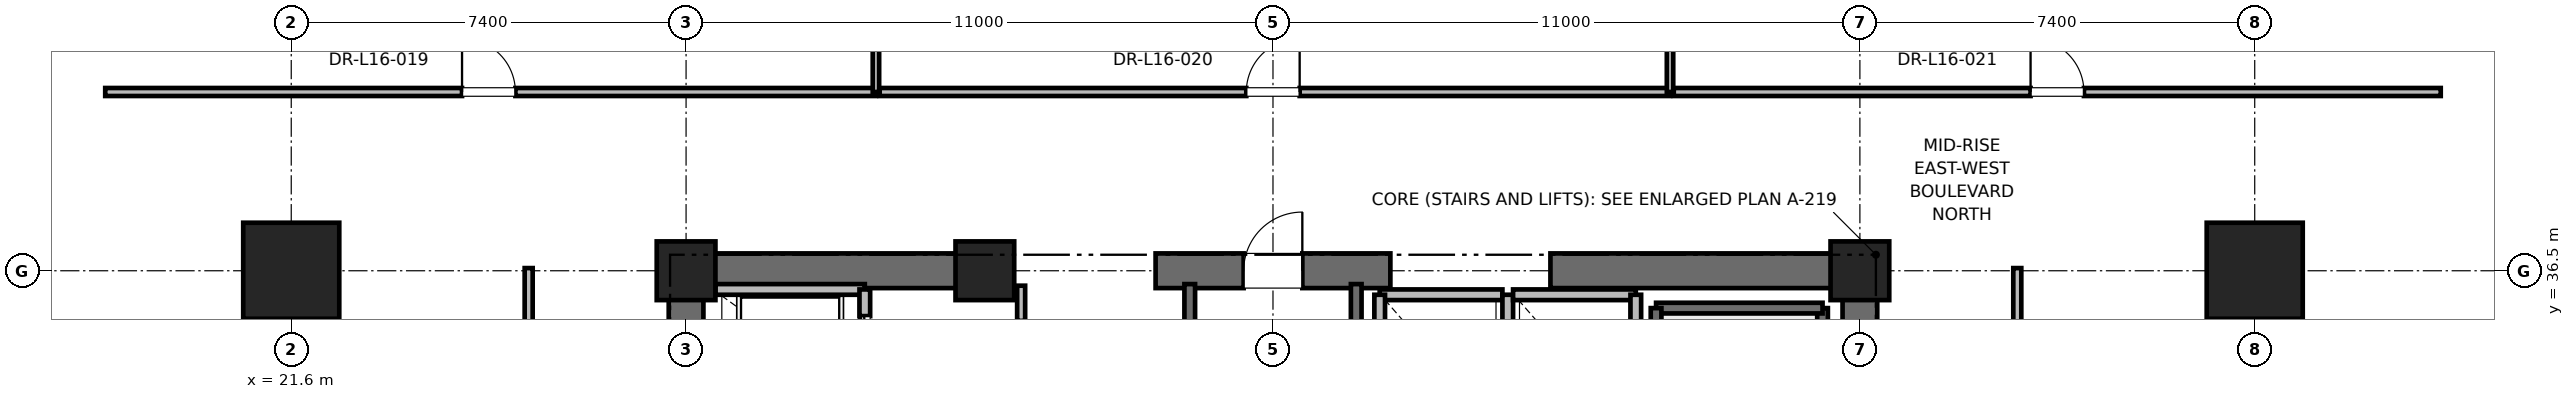
"""IFC4 building model, lengths in metres.
Left out: names, types, materials, properties, quantities, classifications, styles, units other than length and angle.
Written with IfcOpenShell. Run it as: python <this file> out.ifc"""

import sys

from ifc_helpers import new_model, si_unit, direction, frame, frame_2d, origin, origin_2d, place, context, subcontext, project, spatial, rectangle, extrude, element, fill, save


model = new_model("IFC4")
c1 = context("Model", 3, precision=1e-05, world=origin(), true_north=direction((0.0, 1.0)))
c2 = subcontext(c1, "Body", "Model", "MODEL_VIEW")
j1 = project(units=[si_unit("LENGTHUNIT", "METRE"), si_unit("PLANEANGLEUNIT", "RADIAN")], contexts=[c1])
p1 = place(None, origin())
s1 = spatial("IfcSite", under=j1, at=p1, CompositionType="ELEMENT")
p2 = place(p1, origin())
s2 = spatial("IfcBuilding", under=s1, at=p2, CompositionType="ELEMENT")
p3 = place(p2, frame((0.0, 0.0, 71.6)))
s3 = spatial("IfcBuildingStorey", under=s2, at=p3, CompositionType="ELEMENT", Elevation=71.6)
for number, where, z_axis, x_axis in (
    (1, (21.6, 36.5, 0.0), (0.0, 0.0, 1.0), (1.0, 0.0, 0.0)),
    (2, (58.4, 36.5, 0.0), (0.0, 0.0, 1.0), (1.0, 0.0, 0.0)),
):
    element("IfcColumn", number, at=place(p3, frame(where, z_axis=z_axis, x_axis=x_axis)), inside=s3, PredefinedType="COLUMN", context=c2, shape_type="SweptSolid", body=[
        extrude(rectangle(XDim=1.8, YDim=1.8, at=origin_2d()), origin(), (0.0, 0.0, 1.0), 4.0),
    ])
for number, where, z_axis, x_axis in (
    (3, (29.0, 36.5, 0.0), (0.0, 0.0, 1.0), (1.0, 0.0, 0.0)),
    (4, (51.0, 36.5, 0.0), (0.0, 0.0, 1.0), (1.0, 0.0, 0.0)),
    (5, (34.6, 36.5, 0.0), (0.0, 0.0, 1.0), (1.0, 0.0, 0.0)),
):
    element("IfcColumn", number, at=place(p3, frame(where, z_axis=z_axis, x_axis=x_axis)), inside=s3, PredefinedType="PILASTER", context=c2, shape_type="SweptSolid", body=[
        extrude(rectangle(XDim=1.1, YDim=1.1, at=origin_2d()), origin(), (0.0, 0.0, 1.0), 4.0),
    ])
p4 = place(p3, frame((29.0, 36.5, 0.0), z_axis=(0.0, 0.0, 1.0), x_axis=(1.0, 0.0, 0.0)))
e6 = element("IfcWall", 6, at=p4, inside=s3, PredefinedType="SHEAR", context=c2, shape_type="SweptSolid", body=[
    extrude(rectangle(XDim=5.8, YDim=0.65, at=frame_2d((2.9, 0.0))), origin(), (0.0, 0.0, 1.0), 3.76),
])
p5 = place(p3, frame((37.8, 36.5, 0.0), z_axis=(0.0, 0.0, 1.0), x_axis=(1.0, 0.0, 0.0)))
e7 = element("IfcWall", 7, at=p5, inside=s3, PredefinedType="SHEAR", context=c2, shape_type="SweptSolid", body=[
    extrude(rectangle(XDim=4.4, YDim=0.65, at=frame_2d((2.2, 0.0))), origin(), (0.0, 0.0, 1.0), 3.76),
])
p6 = place(p5, frame((1.65, 0.0, 0.0)))
e8 = element("IfcOpeningElement", 8, at=p6, cuts=e7, PredefinedType="OPENING", context=c2, shape_type="SweptSolid", body=[
    extrude(rectangle(XDim=1.1, YDim=2.15, at=frame_2d((0.55, 1.075))), frame((0.0, 0.325, 0.0), z_axis=(0.0, -1.0, 0.0), x_axis=(1.0, 0.0, 0.0)), (0.0, 0.0, 1.0), 0.65),
])
for number, where, z_axis, x_axis in (
    (9, (45.2, 36.5, 0.0), (0.0, 0.0, 1.0), (1.0, 0.0, 0.0)),
    (10, (29.0, 30.7, 0.0), (0.0, 0.0, 1.0), (0.0, 1.0, 0.0)),
):
    element("IfcWall", number, at=place(p3, frame(where, z_axis=z_axis, x_axis=x_axis)), inside=s3, PredefinedType="SHEAR", context=c2, shape_type="SweptSolid", body=[
        extrude(rectangle(XDim=5.8, YDim=0.65, at=frame_2d((2.9, 0.0))), origin(), (0.0, 0.0, 1.0), 3.76),
    ])
p7 = place(p3, frame((51.0, 27.7, 0.0), z_axis=(0.0, 0.0, 1.0), x_axis=(0.0, 1.0, 0.0)))
e11 = element("IfcWall", 11, at=p7, inside=s3, PredefinedType="SHEAR", context=c2, shape_type="SweptSolid", body=[
    extrude(rectangle(XDim=8.8, YDim=0.65, at=frame_2d((4.4, 0.0))), origin(), (0.0, 0.0, 1.0), 3.76),
])
p8 = place(p3, frame((50.3, 27.65, 0.0), z_axis=(0.0, 0.0, 1.0), x_axis=(0.0, 1.0, 0.0)))
e12 = element("IfcWall", 12, at=p8, inside=s3, PredefinedType="SOLIDWALL", context=c2, shape_type="SweptSolid", body=[
    extrude(rectangle(XDim=8.15, YDim=0.2, at=frame_2d((4.075, 0.0))), origin(), (0.0, 0.0, 1.0), 3.76),
])
p9 = place(p3, frame((47.18, 35.8, 0.0), z_axis=(0.0, 0.0, 1.0), x_axis=(1.0, 0.0, 0.0)))
e13 = element("IfcWall", 13, at=p9, inside=s3, PredefinedType="SOLIDWALL", context=c2, shape_type="SweptSolid", body=[
    extrude(rectangle(XDim=3.12, YDim=0.2, at=frame_2d((1.56, 0.0))), origin(), (0.0, 0.0, 1.0), 3.76),
])
p10 = place(p3, frame((47.18, 27.62, 0.0), z_axis=(0.0, 0.0, 1.0), x_axis=(0.0, 1.0, 0.0)))
e14 = element("IfcWall", 14, at=p10, inside=s3, PredefinedType="SOLIDWALL", context=c2, shape_type="SweptSolid", body=[
    extrude(rectangle(XDim=8.18, YDim=0.2, at=frame_2d((4.09, 0.0))), origin(), (0.0, 0.0, 1.0), 3.76),
])
p11 = place(p3, frame((38.44, 27.38, 0.0), z_axis=(0.0, 0.0, 1.0), x_axis=(0.0, 1.0, 0.0)))
e15 = element("IfcWall", 15, at=p11, inside=s3, PredefinedType="SOLIDWALL", context=c2, shape_type="SweptSolid", body=[
    extrude(rectangle(XDim=8.87, YDim=0.2, at=frame_2d((4.435, 0.0))), origin(), (0.0, 0.0, 1.0), 3.76),
])
p12 = place(p3, frame((41.56, 27.68, 0.0), z_axis=(0.0, 0.0, 1.0), x_axis=(0.0, 1.0, 0.0)))
e16 = element("IfcWall", 16, at=p12, inside=s3, PredefinedType="SOLIDWALL", context=c2, shape_type="SweptSolid", body=[
    extrude(rectangle(XDim=8.57, YDim=0.2, at=frame_2d((4.285, 0.0))), origin(), (0.0, 0.0, 1.0), 3.76),
])
p13 = place(p3, frame((32.35, 36.15, 0.0), z_axis=(0.0, 0.0, 1.0), x_axis=(-1.0, 0.0, 0.0)))
e17 = element("IfcWall", 17, at=p13, inside=s3, PredefinedType="SOLIDWALL", context=c2, shape_type="SweptSolid", body=[
    extrude(rectangle(XDim=2.8, YDim=0.2, at=frame_2d((1.4, 0.0))), origin(), (0.0, 0.0, 1.0), 2.889),
])
p14 = place(p3, frame((32.35, 34.05, 0.0), z_axis=(0.0, 0.0, 1.0), x_axis=(0.0, 1.0, 0.0)))
e18 = element("IfcWall", 18, at=p14, inside=s3, PredefinedType="SOLIDWALL", context=c2, shape_type="SweptSolid", body=[
    extrude(rectangle(XDim=2.1, YDim=0.2, at=frame_2d((1.05, 0.0))), origin(), (0.0, 0.0, 1.0), 3.76),
])
p15 = place(p14, frame((0.5, 0.0, 0.0)))
e19 = element("IfcOpeningElement", 19, at=p15, cuts=e18, PredefinedType="OPENING", context=c2, shape_type="SweptSolid", body=[
    extrude(rectangle(XDim=1.1, YDim=2.2, at=frame_2d((0.55, 1.1))), frame((0.0, 0.1, 0.0), z_axis=(0.0, -1.0, 0.0), x_axis=(1.0, 0.0, 0.0)), (0.0, 0.0, 1.0), 0.2),
])
p16 = place(p3, frame((44.3, 36.05, 0.0), z_axis=(0.0, 0.0, 1.0), x_axis=(-1.0, 0.0, 0.0)))
e20 = element("IfcWall", 20, at=p16, inside=s3, PredefinedType="SOLIDWALL", context=c2, shape_type="SweptSolid", body=[
    extrude(rectangle(XDim=2.3, YDim=0.2, at=frame_2d((1.15, 0.0))), origin(), (0.0, 0.0, 1.0), 2.54),
])
for number, where, z_axis, x_axis in (
    (21, (42.0, 36.05, 0.0), (0.0, 0.0, 1.0), (0.0, -1.0, 0.0)),
    (22, (44.4, 33.45, 0.0), (0.0, 0.0, 1.0), (0.0, 1.0, 0.0)),
):
    element("IfcWall", number, at=place(p3, frame(where, z_axis=z_axis, x_axis=x_axis)), inside=s3, PredefinedType="SOLIDWALL", context=c2, shape_type="SweptSolid", body=[
        extrude(rectangle(XDim=2.6, YDim=0.2, at=frame_2d((1.3, 0.0))), origin(), (0.0, 0.0, 1.0), 2.54),
    ])
p17 = place(p3, frame((46.8, 36.05, 0.0), z_axis=(0.0, 0.0, 1.0), x_axis=(-1.0, 0.0, 0.0)))
e23 = element("IfcWall", 23, at=p17, inside=s3, PredefinedType="SOLIDWALL", context=c2, shape_type="SweptSolid", body=[
    extrude(rectangle(XDim=2.3, YDim=0.2, at=frame_2d((1.15, 0.0))), origin(), (0.0, 0.0, 1.0), 2.54),
])
p18 = place(p3, frame((46.8, 33.45, 0.0), z_axis=(0.0, 0.0, 1.0), x_axis=(0.0, 1.0, 0.0)))
e24 = element("IfcWall", 24, at=p18, inside=s3, PredefinedType="SOLIDWALL", context=c2, shape_type="SweptSolid", body=[
    extrude(rectangle(XDim=2.6, YDim=0.2, at=frame_2d((1.3, 0.0))), origin(), (0.0, 0.0, 1.0), 3.76),
])
p19 = place(p3, frame((35.28, 33.95, 0.0), z_axis=(0.0, 0.0, 1.0), x_axis=(0.0, 1.0, 0.0)))
e25 = element("IfcWall", 25, at=p19, inside=s3, PredefinedType="PARTITIONING", context=c2, shape_type="SweptSolid", body=[
    extrude(rectangle(XDim=2.27, YDim=0.15, at=frame_2d((1.135, 0.0))), origin(), (0.0, 0.0, 1.0), 2.54),
])
p20 = place(p19, frame((0.66, 0.0, 0.0)))
e26 = element("IfcOpeningElement", 26, at=p20, cuts=e25, PredefinedType="OPENING", context=c2, shape_type="SweptSolid", body=[
    extrude(rectangle(XDim=0.95, YDim=2.15, at=frame_2d((0.475, 1.075))), frame((0.0, 0.075, 0.0), z_axis=(0.0, -1.0, 0.0), x_axis=(1.0, 0.0, 0.0)), (0.0, 0.0, 1.0), 0.15),
])
p21 = place(p3, frame((18.114, 39.85, 0.0), z_axis=(0.0, 0.0, 1.0), x_axis=(1.0, 0.0, 0.0)))
e27 = element("IfcWall", 27, at=p21, inside=s3, PredefinedType="PARTITIONING", context=c2, shape_type="SweptSolid", body=[
    extrude(rectangle(XDim=14.445, YDim=0.15, at=frame_2d((7.223, 0.0))), origin(), (0.0, 0.0, 1.0), 2.85),
])
p22 = place(p21, frame((6.688, 0.0, 0.0)))
e28 = element("IfcOpeningElement", 28, at=p22, cuts=e27, PredefinedType="OPENING", context=c2, shape_type="SweptSolid", body=[
    extrude(rectangle(XDim=1.0, YDim=2.15, at=frame_2d((0.5, 1.075))), frame((0.0, 0.075, 0.0), z_axis=(0.0, -1.0, 0.0), x_axis=(1.0, 0.0, 0.0)), (0.0, 0.0, 1.0), 0.15),
])
p23 = place(p3, frame((32.559, 39.85, 0.0), z_axis=(0.0, 0.0, 1.0), x_axis=(0.0, 1.0, 0.0)))
e29 = element("IfcWall", 29, at=p23, inside=s3, PredefinedType="PARTITIONING", context=c2, shape_type="SweptSolid", body=[
    extrude(rectangle(XDim=10.05, YDim=0.12, at=frame_2d((5.025, 0.0))), origin(), (0.0, 0.0, 1.0), 2.39),
])
p24 = place(p3, frame((32.629, 39.85, 0.0), z_axis=(0.0, 0.0, 1.0), x_axis=(1.0, 0.0, 0.0)))
e30 = element("IfcWall", 30, at=p24, inside=s3, PredefinedType="PARTITIONING", context=c2, shape_type="SweptSolid", body=[
    extrude(rectangle(XDim=14.813, YDim=0.15, at=frame_2d((7.406, 0.0))), origin(), (0.0, 0.0, 1.0), 2.85),
])
p25 = place(p24, frame((6.871, 0.0, 0.0)))
e31 = element("IfcOpeningElement", 31, at=p25, cuts=e30, PredefinedType="OPENING", context=c2, shape_type="SweptSolid", body=[
    extrude(rectangle(XDim=1.0, YDim=2.15, at=frame_2d((0.5, 1.075))), frame((0.0, 0.075, 0.0), z_axis=(0.0, -1.0, 0.0), x_axis=(1.0, 0.0, 0.0)), (0.0, 0.0, 1.0), 0.15),
])
p26 = place(p3, frame((47.441, 39.85, 0.0), z_axis=(0.0, 0.0, 1.0), x_axis=(0.0, 1.0, 0.0)))
e32 = element("IfcWall", 32, at=p26, inside=s3, PredefinedType="PARTITIONING", context=c2, shape_type="SweptSolid", body=[
    extrude(rectangle(XDim=10.05, YDim=0.12, at=frame_2d((5.025, 0.0))), origin(), (0.0, 0.0, 1.0), 2.39),
])
p27 = place(p3, frame((47.511, 39.85, 0.0), z_axis=(0.0, 0.0, 1.0), x_axis=(1.0, 0.0, 0.0)))
e33 = element("IfcWall", 33, at=p27, inside=s3, PredefinedType="PARTITIONING", context=c2, shape_type="SweptSolid", body=[
    extrude(rectangle(XDim=14.375, YDim=0.15, at=frame_2d((7.188, 0.0))), origin(), (0.0, 0.0, 1.0), 2.85),
])
p28 = place(p27, frame((6.688, 0.0, 0.0)))
e34 = element("IfcOpeningElement", 34, at=p28, cuts=e33, PredefinedType="OPENING", context=c2, shape_type="SweptSolid", body=[
    extrude(rectangle(XDim=1.0, YDim=2.15, at=frame_2d((0.5, 1.075))), frame((0.0, 0.075, 0.0), z_axis=(0.0, -1.0, 0.0), x_axis=(1.0, 0.0, 0.0)), (0.0, 0.0, 1.0), 0.15),
])
p29 = place(p3, frame((26.05, 26.122, 0.0), z_axis=(0.0, 0.0, 1.0), x_axis=(0.0, 1.0, 0.0)))
e35 = element("IfcWall", 35, at=p29, inside=s3, PredefinedType="PARTITIONING", context=c2, shape_type="SweptSolid", body=[
    extrude(rectangle(XDim=10.428, YDim=0.15, at=frame_2d((5.214, 0.0))), origin(), (0.0, 0.0, 1.0), 2.85),
])
p30 = place(p29, frame((4.389, 0.0, 0.0)))
e36 = element("IfcOpeningElement", 36, at=p30, cuts=e35, PredefinedType="OPENING", context=c2, shape_type="SweptSolid", body=[
    extrude(rectangle(XDim=1.5, YDim=2.25, at=frame_2d((0.75, 1.125))), frame((0.0, 0.075, 0.0), z_axis=(0.0, -1.0, 0.0), x_axis=(1.0, 0.0, 0.0)), (0.0, 0.0, 1.0), 0.15),
])
p31 = place(p3, frame((53.95, 29.018, 0.0), z_axis=(0.0, 0.0, 1.0), x_axis=(0.0, 1.0, 0.0)))
e37 = element("IfcWall", 37, at=p31, inside=s3, PredefinedType="PARTITIONING", context=c2, shape_type="SweptSolid", body=[
    extrude(rectangle(XDim=7.532, YDim=0.15, at=frame_2d((3.766, 0.0))), origin(), (0.0, 0.0, 1.0), 2.85),
])
p32 = place(p31, frame((3.191, 0.0, 0.0)))
e38 = element("IfcOpeningElement", 38, at=p32, cuts=e37, PredefinedType="OPENING", context=c2, shape_type="SweptSolid", body=[
    extrude(rectangle(XDim=1.0, YDim=2.15, at=frame_2d((0.5, 1.075))), frame((0.0, 0.075, 0.0), z_axis=(0.0, -1.0, 0.0), x_axis=(1.0, 0.0, 0.0)), (0.0, 0.0, 1.0), 0.15),
])
p33 = place(p6, origin())
e39 = element("IfcDoor", 39, at=p33, inside=s3, OperationType="SINGLE_SWING_RIGHT", PredefinedType="DOOR", context=c2, shape_type="SweptSolid", body=[
    extrude(rectangle(XDim=1.1, YDim=2.15, at=frame_2d((0.55, 1.075))), frame((0.0, 0.025, 0.0), z_axis=(0.0, -1.0, 0.0), x_axis=(1.0, 0.0, 0.0)), (0.0, 0.0, 1.0), 0.05),
])
fill(e8, e39)
p34 = place(p15, origin())
e40 = element("IfcDoor", 40, at=p34, inside=s3, OperationType="SLIDING_TO_RIGHT", PredefinedType="DOOR", context=c2, shape_type="SweptSolid", body=[
    extrude(rectangle(XDim=1.1, YDim=2.2, at=frame_2d((0.55, 1.1))), frame((0.0, 0.025, 0.0), z_axis=(0.0, -1.0, 0.0), x_axis=(1.0, 0.0, 0.0)), (0.0, 0.0, 1.0), 0.05),
])
fill(e19, e40)
p35 = place(p22, origin())
e41 = element("IfcDoor", 41, at=p35, inside=s3, OperationType="SINGLE_SWING_LEFT", PredefinedType="DOOR", context=c2, shape_type="SweptSolid", body=[
    extrude(rectangle(XDim=1.0, YDim=2.15, at=frame_2d((0.5, 1.075))), frame((0.0, 0.025, 0.0), z_axis=(0.0, -1.0, 0.0), x_axis=(1.0, 0.0, 0.0)), (0.0, 0.0, 1.0), 0.05),
])
fill(e28, e41)
p36 = place(p25, origin())
e42 = element("IfcDoor", 42, at=p36, inside=s3, OperationType="SINGLE_SWING_RIGHT", PredefinedType="DOOR", context=c2, shape_type="SweptSolid", body=[
    extrude(rectangle(XDim=1.0, YDim=2.15, at=frame_2d((0.5, 1.075))), frame((0.0, 0.025, 0.0), z_axis=(0.0, -1.0, 0.0), x_axis=(1.0, 0.0, 0.0)), (0.0, 0.0, 1.0), 0.05),
])
fill(e31, e42)
p37 = place(p28, origin())
e43 = element("IfcDoor", 43, at=p37, inside=s3, OperationType="SINGLE_SWING_LEFT", PredefinedType="DOOR", context=c2, shape_type="SweptSolid", body=[
    extrude(rectangle(XDim=1.0, YDim=2.15, at=frame_2d((0.5, 1.075))), frame((0.0, 0.025, 0.0), z_axis=(0.0, -1.0, 0.0), x_axis=(1.0, 0.0, 0.0)), (0.0, 0.0, 1.0), 0.05),
])
fill(e34, e43)
save(model, sys.argv[1])
